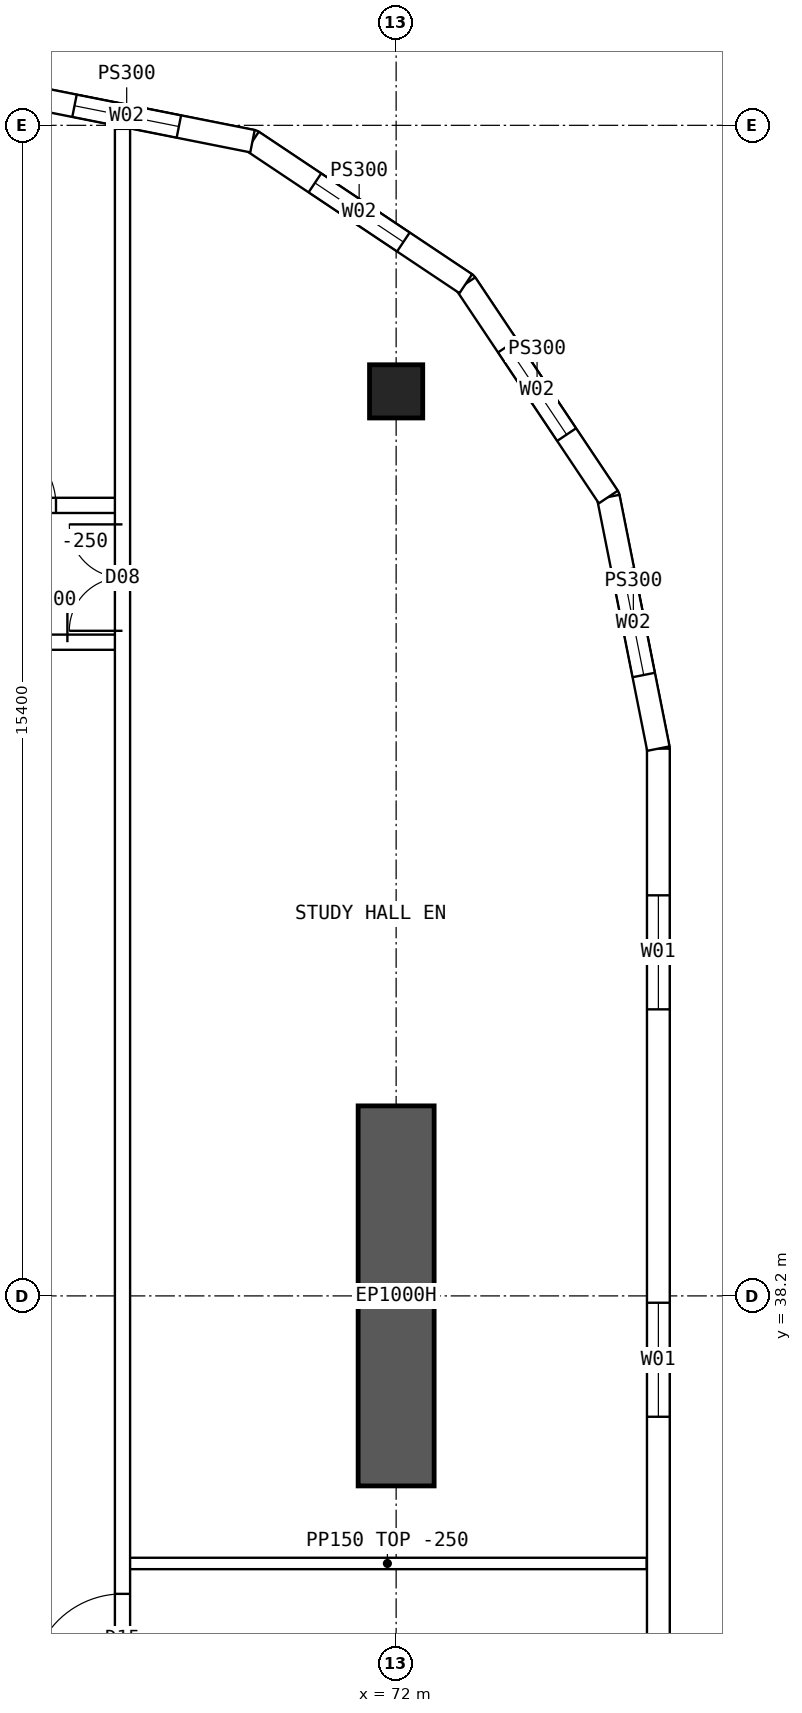
"""IFC4 building model, lengths in metres.
Left out: names, types, materials, properties, quantities, classifications, styles, units other than length and angle.
Written with IfcOpenShell. Run it as: python <this file> out.ifc"""

import sys

from ifc_helpers import new_model, si_unit, direction, frame, frame_2d, origin, origin_2d, place, context, subcontext, project, spatial, polyline, rectangle, hollow_rectangle, outline, extrude, element, fill, save


model = new_model("IFC4")
c1 = context("Model", 3, precision=1e-05, world=origin(), true_north=direction((0.0, 1.0)))
c2 = subcontext(c1, "Body", "Model", "MODEL_VIEW")
j1 = project(units=[si_unit("LENGTHUNIT", "METRE"), si_unit("PLANEANGLEUNIT", "RADIAN")], contexts=[c1])
p1 = place(None, origin())
s1 = spatial("IfcSite", under=j1, at=p1, CompositionType="ELEMENT")
p2 = place(p1, origin())
s2 = spatial("IfcBuilding", under=s1, at=p2, CompositionType="ELEMENT")
p3 = place(p2, frame((0.0, 0.0, 156.1)))
s3 = spatial("IfcBuildingStorey", under=s2, at=p3, CompositionType="ELEMENT", Elevation=156.1)
p4 = place(p3, frame((72.0, 50.1, 0.0), z_axis=(0.0, 0.0, 1.0), x_axis=(1.0, 0.0, 0.0)))
e1 = element("IfcColumn", 1, at=p4, inside=s3, PredefinedType="COLUMN", context=c2, shape_type="SweptSolid", body=[
    extrude(hollow_rectangle(XDim=0.7, YDim=0.7, WallThickness=0.07, at=origin_2d()), origin(), (0.0, 0.0, 1.0), 3.75),
])
p5 = place(p3, frame((72.0, 35.7, 0.0), z_axis=(0.0, 0.0, 1.0), x_axis=(0.0, 1.0, 0.0)))
e2 = element("IfcWall", 2, at=p5, inside=s3, PredefinedType="SHEAR", context=c2, shape_type="SweptSolid", body=[
    extrude(rectangle(XDim=5.0, YDim=1.0, at=frame_2d((2.5, 0.0))), origin(), (0.0, 0.0, 1.0), 3.75),
])
p6 = place(p3, frame((75.45, 18.6, 0.0), z_axis=(0.0, 0.0, 1.0), x_axis=(0.0, 1.0, 0.0)))
e3 = element("IfcWall", 3, at=p6, inside=s3, PredefinedType="SOLIDWALL", context=c2, shape_type="SweptSolid", body=[
    extrude(outline(polyline([(-0.015, -0.15), (26.815, -0.15), (26.785, 0.15), (0.015, 0.15), (-0.015, -0.15)])), origin(), (0.0, 0.0, 1.0), 3.5),
])
p7 = place(p6, frame((1.93, 0.0, 0.9)))
e4 = element("IfcOpeningElement", 4, at=p7, cuts=e3, PredefinedType="OPENING", context=c2, shape_type="SweptSolid", body=[
    extrude(rectangle(XDim=1.5, YDim=2.0, at=frame_2d((0.75, 1.0))), frame((0.0, 0.16, 0.0), z_axis=(0.0, -1.0, 0.0), x_axis=(1.0, 0.0, 0.0)), (0.0, 0.0, 1.0), 0.32),
])
p8 = place(p6, frame((7.29, 0.0, 0.9)))
e5 = element("IfcOpeningElement", 5, at=p8, cuts=e3, PredefinedType="OPENING", context=c2, shape_type="SweptSolid", body=[
    extrude(rectangle(XDim=1.5, YDim=2.0, at=frame_2d((0.75, 1.0))), frame((0.0, 0.16, 0.0), z_axis=(0.0, -1.0, 0.0), x_axis=(1.0, 0.0, 0.0)), (0.0, 0.0, 1.0), 0.32),
])
p9 = place(p6, frame((12.65, 0.0, 0.9)))
e6 = element("IfcOpeningElement", 6, at=p9, cuts=e3, PredefinedType="OPENING", context=c2, shape_type="SweptSolid", body=[
    extrude(rectangle(XDim=1.5, YDim=2.0, at=frame_2d((0.75, 1.0))), frame((0.0, 0.16, 0.0), z_axis=(0.0, -1.0, 0.0), x_axis=(1.0, 0.0, 0.0)), (0.0, 0.0, 1.0), 0.32),
])
p10 = place(p6, frame((18.01, 0.0, 0.9)))
e7 = element("IfcOpeningElement", 7, at=p10, cuts=e3, PredefinedType="OPENING", context=c2, shape_type="SweptSolid", body=[
    extrude(rectangle(XDim=1.5, YDim=2.0, at=frame_2d((0.75, 1.0))), frame((0.0, 0.16, 0.0), z_axis=(0.0, -1.0, 0.0), x_axis=(1.0, 0.0, 0.0)), (0.0, 0.0, 1.0), 0.32),
])
p11 = place(p6, frame((23.37, 0.0, 0.9)))
e8 = element("IfcOpeningElement", 8, at=p11, cuts=e3, PredefinedType="OPENING", context=c2, shape_type="SweptSolid", body=[
    extrude(rectangle(XDim=1.5, YDim=2.0, at=frame_2d((0.75, 1.0))), frame((0.0, 0.16, 0.0), z_axis=(0.0, -1.0, 0.0), x_axis=(1.0, 0.0, 0.0)), (0.0, 0.0, 1.0), 0.32),
])
p12 = place(p3, frame((75.45, 45.4, 0.0), z_axis=(0.0, 0.0, 1.0), x_axis=(-0.19508664885, 0.980786011034, 0.0)))
e9 = element("IfcWall", 9, at=p12, inside=s3, PredefinedType="SOLIDWALL", context=c2, shape_type="SweptSolid", body=[
    extrude(outline(polyline([(-0.015, -0.15), (3.405, -0.15), (3.345, 0.15), (0.015, 0.15), (-0.015, -0.15)])), origin(), (0.0, 0.0, 1.0), 3.5),
])
p13 = place(p12, frame((0.988, 0.0, 0.9)))
e10 = element("IfcOpeningElement", 10, at=p13, cuts=e9, PredefinedType="OPENING", context=c2, shape_type="SweptSolid", body=[
    extrude(rectangle(XDim=1.4, YDim=1.8, at=frame_2d((0.7, 0.9))), frame((0.0, 0.16, 0.0), z_axis=(0.0, -1.0, 0.0), x_axis=(1.0, 0.0, 0.0)), (0.0, 0.0, 1.0), 0.32),
])
p14 = place(p3, frame((74.792, 48.71, 0.0), z_axis=(0.0, 0.0, 1.0), x_axis=(-0.555534554399, 0.831493450887, 0.0)))
e11 = element("IfcWall", 11, at=p14, inside=s3, PredefinedType="SOLIDWALL", context=c2, shape_type="SweptSolid", body=[
    extrude(outline(polyline([(-0.03, -0.15), (3.405, -0.15), (3.345, 0.15), (0.03, 0.15), (-0.03, -0.15)])), origin(), (0.0, 0.0, 1.0), 3.5),
])
p15 = place(p14, frame((0.988, 0.0, 0.9)))
e12 = element("IfcOpeningElement", 12, at=p15, cuts=e11, PredefinedType="OPENING", context=c2, shape_type="SweptSolid", body=[
    extrude(rectangle(XDim=1.4, YDim=1.8, at=frame_2d((0.7, 0.9))), frame((0.0, 0.16, 0.0), z_axis=(0.0, -1.0, 0.0), x_axis=(1.0, 0.0, 0.0)), (0.0, 0.0, 1.0), 0.32),
])
p16 = place(p3, frame((72.917, 51.517, 0.0), z_axis=(0.0, 0.0, 1.0), x_axis=(-0.831493450887, 0.555534554399, 0.0)))
e13 = element("IfcWall", 13, at=p16, inside=s3, PredefinedType="SOLIDWALL", context=c2, shape_type="SweptSolid", body=[
    extrude(outline(polyline([(-0.03, -0.15), (3.405, -0.15), (3.345, 0.15), (0.03, 0.15), (-0.03, -0.15)])), origin(), (0.0, 0.0, 1.0), 3.5),
])
p17 = place(p16, frame((0.988, 0.0, 0.9)))
e14 = element("IfcOpeningElement", 14, at=p17, cuts=e13, PredefinedType="OPENING", context=c2, shape_type="SweptSolid", body=[
    extrude(rectangle(XDim=1.4, YDim=1.8, at=frame_2d((0.7, 0.9))), frame((0.0, 0.16, 0.0), z_axis=(0.0, -1.0, 0.0), x_axis=(1.0, 0.0, 0.0)), (0.0, 0.0, 1.0), 0.32),
])
p18 = place(p3, frame((70.11, 53.392, 0.0), z_axis=(0.0, 0.0, 1.0), x_axis=(-0.98078325777, 0.195100490205, 0.0)))
e15 = element("IfcWall", 15, at=p18, inside=s3, PredefinedType="SOLIDWALL", context=c2, shape_type="SweptSolid", body=[
    extrude(outline(polyline([(-0.03, -0.15), (3.405, -0.15), (3.345, 0.15), (0.03, 0.15), (-0.03, -0.15)])), origin(), (0.0, 0.0, 1.0), 3.5),
])
p19 = place(p18, frame((0.988, 0.0, 0.9)))
e16 = element("IfcOpeningElement", 16, at=p19, cuts=e15, PredefinedType="OPENING", context=c2, shape_type="SweptSolid", body=[
    extrude(rectangle(XDim=1.4, YDim=1.8, at=frame_2d((0.7, 0.9))), frame((0.0, 0.16, 0.0), z_axis=(0.0, -1.0, 0.0), x_axis=(1.0, 0.0, 0.0)), (0.0, 0.0, 1.0), 0.32),
])
p20 = place(p3, frame((66.425, 48.6, 0.0), z_axis=(0.0, 0.0, 1.0), x_axis=(1.0, 0.0, 0.0)))
e17 = element("IfcWall", 17, at=p20, inside=s3, PredefinedType="SOLIDWALL", context=c2, shape_type="SweptSolid", body=[
    extrude(rectangle(XDim=1.975, YDim=0.2, at=frame_2d((0.987, 0.0))), origin(), (0.0, 0.0, 1.0), 3.5),
])
p21 = place(p20, frame((0.2, 0.0, 0.0)))
e18 = element("IfcOpeningElement", 18, at=p21, cuts=e17, PredefinedType="OPENING", context=c2, shape_type="SweptSolid", body=[
    extrude(rectangle(XDim=0.9, YDim=2.1, at=frame_2d((0.45, 1.05))), frame((0.0, 0.11, 0.0), z_axis=(0.0, -1.0, 0.0), x_axis=(1.0, 0.0, 0.0)), (0.0, 0.0, 1.0), 0.22),
])
p22 = place(p3, frame((66.425, 46.8, 0.0), z_axis=(0.0, 0.0, 1.0), x_axis=(1.0, 0.0, 0.0)))
e19 = element("IfcWall", 19, at=p22, inside=s3, PredefinedType="SOLIDWALL", context=c2, shape_type="SweptSolid", body=[
    extrude(rectangle(XDim=1.975, YDim=0.2, at=frame_2d((0.987, 0.0))), origin(), (0.0, 0.0, 1.0), 3.5),
])
p23 = place(p22, frame((0.05, 0.0, 0.0)))
e20 = element("IfcOpeningElement", 20, at=p23, cuts=e19, PredefinedType="OPENING", context=c2, shape_type="SweptSolid", body=[
    extrude(rectangle(XDim=1.2, YDim=2.1, at=frame_2d((0.6, 1.05))), frame((0.0, 0.11, 0.0), z_axis=(0.0, -1.0, 0.0), x_axis=(1.0, 0.0, 0.0)), (0.0, 0.0, 1.0), 0.22),
])
p24 = place(p3, frame((68.4, 10.446, 0.0), z_axis=(0.0, 0.0, 1.0), x_axis=(0.0, 1.0, 0.0)))
e21 = element("IfcWall", 21, at=p24, inside=s3, PredefinedType="SOLIDWALL", context=c2, shape_type="SweptSolid", body=[
    extrude(rectangle(XDim=43.107, YDim=0.2, at=frame_2d((21.554, 0.0))), origin(), (0.0, 0.0, 1.0), 3.5),
])
p25 = place(p24, frame((13.914, 0.0, 0.0)))
e22 = element("IfcOpeningElement", 22, at=p25, cuts=e21, PredefinedType="OPENING", context=c2, shape_type="SweptSolid", body=[
    extrude(rectangle(XDim=1.2, YDim=2.1, at=frame_2d((0.6, 1.05))), frame((0.0, 0.11, 0.0), z_axis=(0.0, -1.0, 0.0), x_axis=(1.0, 0.0, 0.0)), (0.0, 0.0, 1.0), 0.22),
])
p26 = place(p24, frame((22.634, 0.0, 0.0)))
e23 = element("IfcOpeningElement", 23, at=p26, cuts=e21, PredefinedType="OPENING", context=c2, shape_type="SweptSolid", body=[
    extrude(rectangle(XDim=1.2, YDim=2.1, at=frame_2d((0.6, 1.05))), frame((0.0, 0.11, 0.0), z_axis=(0.0, -1.0, 0.0), x_axis=(1.0, 0.0, 0.0)), (0.0, 0.0, 1.0), 0.22),
])
p27 = place(p24, frame((5.104, 0.0, 0.0)))
e24 = element("IfcOpeningElement", 24, at=p27, cuts=e21, PredefinedType="OPENING", context=c2, shape_type="SweptSolid", body=[
    extrude(rectangle(XDim=1.4, YDim=2.1, at=frame_2d((0.7, 1.05))), frame((0.0, 0.11, 0.0), z_axis=(0.0, -1.0, 0.0), x_axis=(1.0, 0.0, 0.0)), (0.0, 0.0, 1.0), 0.22),
])
p28 = place(p24, frame((36.504, 0.0, 0.0)))
e25 = element("IfcOpeningElement", 25, at=p28, cuts=e21, PredefinedType="OPENING", context=c2, shape_type="SweptSolid", body=[
    extrude(rectangle(XDim=1.4, YDim=2.1, at=frame_2d((0.7, 1.05))), frame((0.0, 0.11, 0.0), z_axis=(0.0, -1.0, 0.0), x_axis=(1.0, 0.0, 0.0)), (0.0, 0.0, 1.0), 0.22),
])
p29 = place(p3, frame((68.475, 34.68, 0.0), z_axis=(0.0, 0.0, 1.0), x_axis=(1.0, 0.0, 0.0)))
e26 = element("IfcWall", 26, at=p29, inside=s3, PredefinedType="PARTITIONING", context=c2, shape_type="SweptSolid", body=[
    extrude(outline(polyline([(0.0, 0.0), (6.82, 0.0), (6.82, 3.5), (3.827, 3.5), (3.825, 3.05), (3.227, 3.05), (3.225, 3.5), (0.0, 3.5), (0.0, 0.0)])), frame((0.0, 0.075, 0.0), z_axis=(0.0, -1.0, 0.0), x_axis=(1.0, 0.0, 0.0)), (0.0, 0.0, 1.0), 0.15),
])
p30 = place(p10, origin())
e27 = element("IfcWindow", 27, at=p30, inside=s3, PartitioningType="SINGLE_PANEL", PredefinedType="WINDOW", context=c2, shape_type="SweptSolid", body=[
    extrude(rectangle(XDim=1.5, YDim=2.0, at=frame_2d((0.75, 1.0))), frame((0.0, 0.03, 0.0), z_axis=(0.0, -1.0, 0.0), x_axis=(1.0, 0.0, 0.0)), (0.0, 0.0, 1.0), 0.06),
])
fill(e7, e27)
p31 = place(p11, origin())
e28 = element("IfcWindow", 28, at=p31, inside=s3, PartitioningType="SINGLE_PANEL", PredefinedType="WINDOW", context=c2, shape_type="SweptSolid", body=[
    extrude(rectangle(XDim=1.5, YDim=2.0, at=frame_2d((0.75, 1.0))), frame((0.0, 0.03, 0.0), z_axis=(0.0, -1.0, 0.0), x_axis=(1.0, 0.0, 0.0)), (0.0, 0.0, 1.0), 0.06),
])
fill(e8, e28)
p32 = place(p13, origin())
e29 = element("IfcWindow", 29, at=p32, inside=s3, PartitioningType="SINGLE_PANEL", PredefinedType="WINDOW", context=c2, shape_type="SweptSolid", body=[
    extrude(rectangle(XDim=1.4, YDim=1.8, at=frame_2d((0.7, 0.9))), frame((0.0, 0.03, 0.0), z_axis=(0.0, -1.0, 0.0), x_axis=(1.0, 0.0, 0.0)), (0.0, 0.0, 1.0), 0.06),
])
fill(e10, e29)
p33 = place(p15, origin())
e30 = element("IfcWindow", 30, at=p33, inside=s3, PartitioningType="SINGLE_PANEL", PredefinedType="WINDOW", context=c2, shape_type="SweptSolid", body=[
    extrude(rectangle(XDim=1.4, YDim=1.8, at=frame_2d((0.7, 0.9))), frame((0.0, 0.03, 0.0), z_axis=(0.0, -1.0, 0.0), x_axis=(1.0, 0.0, 0.0)), (0.0, 0.0, 1.0), 0.06),
])
fill(e12, e30)
p34 = place(p17, origin())
e31 = element("IfcWindow", 31, at=p34, inside=s3, PartitioningType="SINGLE_PANEL", PredefinedType="WINDOW", context=c2, shape_type="SweptSolid", body=[
    extrude(rectangle(XDim=1.4, YDim=1.8, at=frame_2d((0.7, 0.9))), frame((0.0, 0.03, 0.0), z_axis=(0.0, -1.0, 0.0), x_axis=(1.0, 0.0, 0.0)), (0.0, 0.0, 1.0), 0.06),
])
fill(e14, e31)
p35 = place(p19, origin())
e32 = element("IfcWindow", 32, at=p35, inside=s3, PartitioningType="SINGLE_PANEL", PredefinedType="WINDOW", context=c2, shape_type="SweptSolid", body=[
    extrude(rectangle(XDim=1.4, YDim=1.8, at=frame_2d((0.7, 0.9))), frame((0.0, 0.03, 0.0), z_axis=(0.0, -1.0, 0.0), x_axis=(1.0, 0.0, 0.0)), (0.0, 0.0, 1.0), 0.06),
])
fill(e16, e32)
p36 = place(p23, origin())
e33 = element("IfcDoor", 33, at=p36, inside=s3, OperationType="DOUBLE_DOOR_SINGLE_SWING", PredefinedType="DOOR", context=c2, shape_type="SweptSolid", body=[
    extrude(rectangle(XDim=1.2, YDim=2.1, at=frame_2d((0.6, 1.05))), frame((0.0, 0.025, 0.0), z_axis=(0.0, -1.0, 0.0), x_axis=(1.0, 0.0, 0.0)), (0.0, 0.0, 1.0), 0.05),
])
fill(e20, e33)
p37 = place(p26, origin())
e34 = element("IfcDoor", 34, at=p37, inside=s3, OperationType="SINGLE_SWING_LEFT", PredefinedType="DOOR", context=c2, shape_type="SweptSolid", body=[
    extrude(rectangle(XDim=1.2, YDim=2.1, at=frame_2d((0.6, 1.05))), frame((0.0, 0.025, 0.0), z_axis=(0.0, -1.0, 0.0), x_axis=(1.0, 0.0, 0.0)), (0.0, 0.0, 1.0), 0.05),
])
fill(e23, e34)
p38 = place(p28, origin())
e35 = element("IfcDoor", 35, at=p38, inside=s3, OperationType="DOUBLE_DOOR_SINGLE_SWING", PredefinedType="DOOR", context=c2, shape_type="SweptSolid", body=[
    extrude(rectangle(XDim=1.4, YDim=2.1, at=frame_2d((0.7, 1.05))), frame((0.0, 0.025, 0.0), z_axis=(0.0, -1.0, 0.0), x_axis=(1.0, 0.0, 0.0)), (0.0, 0.0, 1.0), 0.05),
])
fill(e25, e35)
p39 = place(p21, origin())
e36 = element("IfcDoor", 36, at=p39, inside=s3, OperationType="SINGLE_SWING_LEFT", PredefinedType="DOOR", context=c2, shape_type="SweptSolid", body=[
    extrude(rectangle(XDim=0.9, YDim=2.1, at=frame_2d((0.45, 1.05))), frame((0.0, 0.025, 0.0), z_axis=(0.0, -1.0, 0.0), x_axis=(1.0, 0.0, 0.0)), (0.0, 0.0, 1.0), 0.05),
])
fill(e18, e36)
save(model, sys.argv[1])
